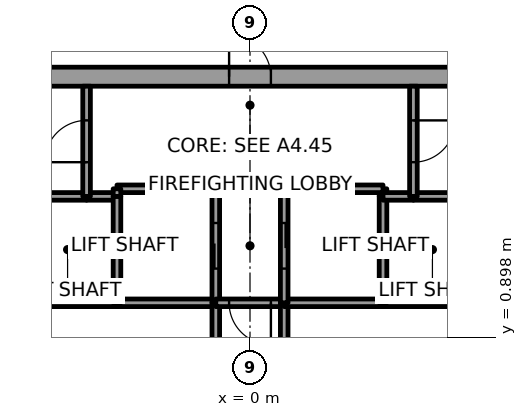
"""IFC4 building model, lengths in metres.
Left out: names, types, materials, properties, quantities, classifications, styles, units other than length and angle.
Written with IfcOpenShell. Run it as: python <this file> out.ifc"""

import sys

from ifc_helpers import new_model, si_unit, direction, frame, frame_2d, origin, place, context, subcontext, project, spatial, rectangle, extrude, element, fill, save


model = new_model("IFC4")
c1 = context("Model", 3, precision=1e-05, world=origin(), true_north=direction((0.0, 1.0)))
c2 = subcontext(c1, "Body", "Model", "MODEL_VIEW")
j1 = project(units=[si_unit("LENGTHUNIT", "METRE"), si_unit("PLANEANGLEUNIT", "RADIAN")], contexts=[c1])
p1 = place(None, origin())
s1 = spatial("IfcSite", under=j1, at=p1, CompositionType="ELEMENT")
p2 = place(p1, origin())
s2 = spatial("IfcBuilding", under=s1, at=p2, CompositionType="ELEMENT")
p3 = place(p2, frame((0.0, 0.0, 193.8)))
s3 = spatial("IfcBuildingStorey", under=s2, at=p3, CompositionType="ELEMENT", Elevation=193.8)
p4 = place(p3, frame((-11.0, 7.75, 0.0), z_axis=(0.0, 0.0, 1.0), x_axis=(1.0, 0.0, 0.0)))
e1 = element("IfcWall", 1, at=p4, inside=s3, PredefinedType="SHEAR", context=c2, shape_type="SweptSolid", body=[
    extrude(rectangle(XDim=22.0, YDim=0.5, at=frame_2d((11.0, 0.0))), origin(), (0.0, 0.0, 1.0), 4.0),
])
p5 = place(p4, frame((10.45, 0.0, 0.0)))
e2 = element("IfcOpeningElement", 2, at=p5, cuts=e1, PredefinedType="OPENING", context=c2, shape_type="SweptSolid", body=[
    extrude(rectangle(XDim=1.1, YDim=2.1, at=frame_2d((0.55, 1.05))), frame((0.0, 0.25, 0.0), z_axis=(0.0, -1.0, 0.0), x_axis=(1.0, 0.0, 0.0)), (0.0, 0.0, 1.0), 0.5),
])
p6 = place(p3, frame((-3.5, 1.8, 0.0), z_axis=(0.0, 0.0, 1.0), x_axis=(-1.0, 0.0, 0.0)))
e3 = element("IfcWall", 3, at=p6, inside=s3, PredefinedType="SOLIDWALL", context=c2, shape_type="SweptSolid", body=[
    extrude(rectangle(XDim=2.6, YDim=0.2, at=frame_2d((1.3, 0.0))), origin(), (0.0, 0.0, 1.0), 3.85),
])
p7 = place(p3, frame((-4.3, 4.6, 0.0), z_axis=(0.0, 0.0, 1.0), x_axis=(-1.0, 0.0, 0.0)))
e4 = element("IfcWall", 4, at=p7, inside=s3, PredefinedType="SOLIDWALL", context=c2, shape_type="SweptSolid", body=[
    extrude(rectangle(XDim=1.8, YDim=0.2, at=frame_2d((0.9, 0.0))), origin(), (0.0, 0.0, 1.0), 3.85),
])
p8 = place(p3, frame((-3.5, 4.6, 0.0), z_axis=(0.0, 0.0, 1.0), x_axis=(-1.0, 0.0, 0.0)))
e5 = element("IfcWall", 5, at=p8, inside=s3, PredefinedType="SOLIDWALL", context=c2, shape_type="SweptSolid", body=[
    extrude(rectangle(XDim=0.8, YDim=0.2, at=frame_2d((0.4, 0.0))), origin(), (0.0, 0.0, 1.0), 3.85),
])
p9 = place(p3, frame((-4.3, 4.6, 0.0), z_axis=(0.0, 0.0, 1.0), x_axis=(0.0, 1.0, 0.0)))
e6 = element("IfcWall", 6, at=p9, inside=s3, PredefinedType="SOLIDWALL", context=c2, shape_type="SweptSolid", body=[
    extrude(rectangle(XDim=2.9, YDim=0.2, at=frame_2d((1.45, 0.0))), origin(), (0.0, 0.0, 1.0), 3.85),
])
p10 = place(p9, frame((0.9, 0.0, 0.0)))
e7 = element("IfcOpeningElement", 7, at=p10, cuts=e6, PredefinedType="OPENING", context=c2, shape_type="SweptSolid", body=[
    extrude(rectangle(XDim=1.1, YDim=2.1, at=frame_2d((0.55, 1.05))), frame((0.0, 0.1, 0.0), z_axis=(0.0, -1.0, 0.0), x_axis=(1.0, 0.0, 0.0)), (0.0, 0.0, 1.0), 0.2),
])
p11 = place(p3, frame((-0.9, 1.8, 0.0), z_axis=(0.0, 0.0, 1.0), x_axis=(-1.0, 0.0, 0.0)))
e8 = element("IfcWall", 8, at=p11, inside=s3, PredefinedType="SOLIDWALL", context=c2, shape_type="SweptSolid", body=[
    extrude(rectangle(XDim=2.6, YDim=0.2, at=frame_2d((1.3, 0.0))), origin(), (0.0, 0.0, 1.0), 3.85),
])
p12 = place(p3, frame((-3.5, 4.6, 0.0), z_axis=(0.0, 0.0, 1.0), x_axis=(0.0, -1.0, 0.0)))
e9 = element("IfcWall", 9, at=p12, inside=s3, PredefinedType="SOLIDWALL", context=c2, shape_type="SweptSolid", body=[
    extrude(rectangle(XDim=2.8, YDim=0.2, at=frame_2d((1.4, 0.0))), origin(), (0.0, 0.0, 1.0), 3.85),
])
p13 = place(p3, frame((-0.9, 1.8, 0.0), z_axis=(0.0, 0.0, 1.0), x_axis=(0.0, 1.0, 0.0)))
e10 = element("IfcWall", 10, at=p13, inside=s3, PredefinedType="SOLIDWALL", context=c2, shape_type="SweptSolid", body=[
    extrude(rectangle(XDim=3.0, YDim=0.2, at=frame_2d((1.5, 0.0))), origin(), (0.0, 0.0, 1.0), 3.85),
])
p14 = place(p13, frame((0.9, 0.0, 0.0)))
e11 = element("IfcOpeningElement", 11, at=p14, cuts=e10, PredefinedType="OPENING", context=c2, shape_type="SweptSolid", body=[
    extrude(rectangle(XDim=1.2, YDim=2.1, at=frame_2d((0.6, 1.05))), frame((0.0, 0.1, 0.0), z_axis=(0.0, -1.0, 0.0), x_axis=(1.0, 0.0, 0.0)), (0.0, 0.0, 1.0), 0.2),
])
p15 = place(p3, frame((-0.9, 4.8, 0.0), z_axis=(0.0, 0.0, 1.0), x_axis=(-1.0, 0.0, 0.0)))
e12 = element("IfcWall", 12, at=p15, inside=s3, PredefinedType="SOLIDWALL", context=c2, shape_type="SweptSolid", body=[
    extrude(rectangle(XDim=2.6, YDim=0.2, at=frame_2d((1.3, 0.0))), origin(), (0.0, 0.0, 1.0), 3.85),
])
p16 = place(p3, frame((-3.5, 4.8, 0.0), z_axis=(0.0, 0.0, 1.0), x_axis=(0.0, -1.0, 0.0)))
e13 = element("IfcWall", 13, at=p16, inside=s3, PredefinedType="SOLIDWALL", context=c2, shape_type="SweptSolid", body=[
    extrude(rectangle(XDim=0.2, YDim=0.2, at=frame_2d((0.1, 0.0))), origin(), (0.0, 0.0, 1.0), 3.85),
])
p17 = place(p3, frame((-0.9, 1.8, 0.0), z_axis=(0.0, 0.0, 1.0), x_axis=(0.0, -1.0, 0.0)))
e14 = element("IfcWall", 14, at=p17, inside=s3, PredefinedType="SOLIDWALL", context=c2, shape_type="SweptSolid", body=[
    extrude(rectangle(XDim=3.6, YDim=0.2, at=frame_2d((1.8, 0.0))), origin(), (0.0, 0.0, 1.0), 3.85),
])
p18 = place(p17, frame((1.05, 0.0, 0.0)))
e15 = element("IfcOpeningElement", 15, at=p18, cuts=e14, PredefinedType="OPENING", context=c2, shape_type="SweptSolid", body=[
    extrude(rectangle(XDim=1.5, YDim=2.1, at=frame_2d((0.75, 1.05))), frame((0.0, 0.1, 0.0), z_axis=(0.0, -1.0, 0.0), x_axis=(1.0, 0.0, 0.0)), (0.0, 0.0, 1.0), 0.2),
])
p19 = place(p3, frame((0.9, 1.8, 0.0), z_axis=(0.0, 0.0, 1.0), x_axis=(-1.0, 0.0, 0.0)))
e16 = element("IfcWall", 16, at=p19, inside=s3, PredefinedType="SOLIDWALL", context=c2, shape_type="SweptSolid", body=[
    extrude(rectangle(XDim=1.8, YDim=0.2, at=frame_2d((0.9, 0.0))), origin(), (0.0, 0.0, 1.0), 3.85),
])
p20 = place(p19, frame((0.35, 0.0, 0.0)))
e17 = element("IfcOpeningElement", 17, at=p20, cuts=e16, PredefinedType="OPENING", context=c2, shape_type="SweptSolid", body=[
    extrude(rectangle(XDim=1.1, YDim=2.1, at=frame_2d((0.55, 1.05))), frame((0.0, 0.1, 0.0), z_axis=(0.0, -1.0, 0.0), x_axis=(1.0, 0.0, 0.0)), (0.0, 0.0, 1.0), 0.2),
])
p21 = place(p3, frame((0.9, -1.8, 0.0), z_axis=(0.0, 0.0, 1.0), x_axis=(0.0, 1.0, 0.0)))
e18 = element("IfcWall", 18, at=p21, inside=s3, PredefinedType="SOLIDWALL", context=c2, shape_type="SweptSolid", body=[
    extrude(rectangle(XDim=3.6, YDim=0.2, at=frame_2d((1.8, 0.0))), origin(), (0.0, 0.0, 1.0), 3.85),
])
p22 = place(p21, frame((1.05, 0.0, 0.0)))
e19 = element("IfcOpeningElement", 19, at=p22, cuts=e18, PredefinedType="OPENING", context=c2, shape_type="SweptSolid", body=[
    extrude(rectangle(XDim=1.5, YDim=2.1, at=frame_2d((0.75, 1.05))), frame((0.0, 0.1, 0.0), z_axis=(0.0, -1.0, 0.0), x_axis=(1.0, 0.0, 0.0)), (0.0, 0.0, 1.0), 0.2),
])
p23 = place(p3, frame((3.5, 1.8, 0.0), z_axis=(0.0, 0.0, 1.0), x_axis=(-1.0, 0.0, 0.0)))
e20 = element("IfcWall", 20, at=p23, inside=s3, PredefinedType="SOLIDWALL", context=c2, shape_type="SweptSolid", body=[
    extrude(rectangle(XDim=2.6, YDim=0.2, at=frame_2d((1.3, 0.0))), origin(), (0.0, 0.0, 1.0), 3.85),
])
p24 = place(p3, frame((3.5, 4.6, 0.0), z_axis=(0.0, 0.0, 1.0), x_axis=(0.0, 1.0, 0.0)))
e21 = element("IfcWall", 21, at=p24, inside=s3, PredefinedType="SOLIDWALL", context=c2, shape_type="SweptSolid", body=[
    extrude(rectangle(XDim=0.2, YDim=0.2, at=frame_2d((0.1, 0.0))), origin(), (0.0, 0.0, 1.0), 3.85),
])
p25 = place(p3, frame((3.5, 4.8, 0.0), z_axis=(0.0, 0.0, 1.0), x_axis=(-1.0, 0.0, 0.0)))
e22 = element("IfcWall", 22, at=p25, inside=s3, PredefinedType="SOLIDWALL", context=c2, shape_type="SweptSolid", body=[
    extrude(rectangle(XDim=2.6, YDim=0.2, at=frame_2d((1.3, 0.0))), origin(), (0.0, 0.0, 1.0), 3.85),
])
p26 = place(p3, frame((0.9, 4.8, 0.0), z_axis=(0.0, 0.0, 1.0), x_axis=(0.0, -1.0, 0.0)))
e23 = element("IfcWall", 23, at=p26, inside=s3, PredefinedType="SOLIDWALL", context=c2, shape_type="SweptSolid", body=[
    extrude(rectangle(XDim=3.0, YDim=0.2, at=frame_2d((1.5, 0.0))), origin(), (0.0, 0.0, 1.0), 3.85),
])
p27 = place(p26, frame((0.9, 0.0, 0.0)))
e24 = element("IfcOpeningElement", 24, at=p27, cuts=e23, PredefinedType="OPENING", context=c2, shape_type="SweptSolid", body=[
    extrude(rectangle(XDim=1.2, YDim=2.1, at=frame_2d((0.6, 1.05))), frame((0.0, 0.1, 0.0), z_axis=(0.0, -1.0, 0.0), x_axis=(1.0, 0.0, 0.0)), (0.0, 0.0, 1.0), 0.2),
])
p28 = place(p3, frame((6.1, 1.8, 0.0), z_axis=(0.0, 0.0, 1.0), x_axis=(-1.0, 0.0, 0.0)))
e25 = element("IfcWall", 25, at=p28, inside=s3, PredefinedType="SOLIDWALL", context=c2, shape_type="SweptSolid", body=[
    extrude(rectangle(XDim=2.6, YDim=0.2, at=frame_2d((1.3, 0.0))), origin(), (0.0, 0.0, 1.0), 3.85),
])
p29 = place(p3, frame((3.5, 1.8, 0.0), z_axis=(0.0, 0.0, 1.0), x_axis=(0.0, 1.0, 0.0)))
e26 = element("IfcWall", 26, at=p29, inside=s3, PredefinedType="SOLIDWALL", context=c2, shape_type="SweptSolid", body=[
    extrude(rectangle(XDim=2.8, YDim=0.2, at=frame_2d((1.4, 0.0))), origin(), (0.0, 0.0, 1.0), 3.85),
])
p30 = place(p3, frame((4.3, 4.6, 0.0), z_axis=(0.0, 0.0, 1.0), x_axis=(-1.0, 0.0, 0.0)))
e27 = element("IfcWall", 27, at=p30, inside=s3, PredefinedType="SOLIDWALL", context=c2, shape_type="SweptSolid", body=[
    extrude(rectangle(XDim=0.8, YDim=0.2, at=frame_2d((0.4, 0.0))), origin(), (0.0, 0.0, 1.0), 3.85),
])
p31 = place(p3, frame((6.1, 4.6, 0.0), z_axis=(0.0, 0.0, 1.0), x_axis=(-1.0, 0.0, 0.0)))
e28 = element("IfcWall", 28, at=p31, inside=s3, PredefinedType="SOLIDWALL", context=c2, shape_type="SweptSolid", body=[
    extrude(rectangle(XDim=1.8, YDim=0.2, at=frame_2d((0.9, 0.0))), origin(), (0.0, 0.0, 1.0), 3.85),
])
p32 = place(p3, frame((4.3, 7.5, 0.0), z_axis=(0.0, 0.0, 1.0), x_axis=(0.0, -1.0, 0.0)))
e29 = element("IfcWall", 29, at=p32, inside=s3, PredefinedType="SOLIDWALL", context=c2, shape_type="SweptSolid", body=[
    extrude(rectangle(XDim=2.9, YDim=0.2, at=frame_2d((1.45, 0.0))), origin(), (0.0, 0.0, 1.0), 3.85),
])
p33 = place(p32, frame((0.9, 0.0, 0.0)))
e30 = element("IfcOpeningElement", 30, at=p33, cuts=e29, PredefinedType="OPENING", context=c2, shape_type="SweptSolid", body=[
    extrude(rectangle(XDim=1.1, YDim=2.1, at=frame_2d((0.55, 1.05))), frame((0.0, 0.1, 0.0), z_axis=(0.0, -1.0, 0.0), x_axis=(1.0, 0.0, 0.0)), (0.0, 0.0, 1.0), 0.2),
])
p34 = place(p14, origin())
e31 = element("IfcDoor", 31, at=p34, inside=s3, OperationType="SLIDING_TO_LEFT", PredefinedType="DOOR", context=c2, shape_type="SweptSolid", body=[
    extrude(rectangle(XDim=1.2, YDim=2.1, at=frame_2d((0.6, 1.05))), frame((0.0, 0.025, 0.0), z_axis=(0.0, -1.0, 0.0), x_axis=(1.0, 0.0, 0.0)), (0.0, 0.0, 1.0), 0.05),
])
fill(e11, e31)
p35 = place(p27, origin())
e32 = element("IfcDoor", 32, at=p35, inside=s3, OperationType="SLIDING_TO_LEFT", PredefinedType="DOOR", context=c2, shape_type="SweptSolid", body=[
    extrude(rectangle(XDim=1.2, YDim=2.1, at=frame_2d((0.6, 1.05))), frame((0.0, 0.025, 0.0), z_axis=(0.0, -1.0, 0.0), x_axis=(1.0, 0.0, 0.0)), (0.0, 0.0, 1.0), 0.05),
])
fill(e24, e32)
p36 = place(p20, origin())
e33 = element("IfcDoor", 33, at=p36, inside=s3, OperationType="SINGLE_SWING_LEFT", PredefinedType="DOOR", context=c2, shape_type="SweptSolid", body=[
    extrude(rectangle(XDim=1.1, YDim=2.1, at=frame_2d((0.55, 1.05))), frame((0.0, 0.025, 0.0), z_axis=(0.0, -1.0, 0.0), x_axis=(1.0, 0.0, 0.0)), (0.0, 0.0, 1.0), 0.05),
])
fill(e17, e33)
p37 = place(p10, origin())
e34 = element("IfcDoor", 34, at=p37, inside=s3, OperationType="SINGLE_SWING_RIGHT", PredefinedType="DOOR", context=c2, shape_type="SweptSolid", body=[
    extrude(rectangle(XDim=1.1, YDim=2.1, at=frame_2d((0.55, 1.05))), frame((0.0, 0.025, 0.0), z_axis=(0.0, -1.0, 0.0), x_axis=(1.0, 0.0, 0.0)), (0.0, 0.0, 1.0), 0.05),
])
fill(e7, e34)
p38 = place(p33, origin())
e35 = element("IfcDoor", 35, at=p38, inside=s3, OperationType="SINGLE_SWING_LEFT", PredefinedType="DOOR", context=c2, shape_type="SweptSolid", body=[
    extrude(rectangle(XDim=1.1, YDim=2.1, at=frame_2d((0.55, 1.05))), frame((0.0, 0.025, 0.0), z_axis=(0.0, -1.0, 0.0), x_axis=(1.0, 0.0, 0.0)), (0.0, 0.0, 1.0), 0.05),
])
fill(e30, e35)
p39 = place(p5, origin())
e36 = element("IfcDoor", 36, at=p39, inside=s3, OperationType="SINGLE_SWING_LEFT", PredefinedType="DOOR", context=c2, shape_type="SweptSolid", body=[
    extrude(rectangle(XDim=1.1, YDim=2.1, at=frame_2d((0.55, 1.05))), frame((0.0, 0.025, 0.0), z_axis=(0.0, -1.0, 0.0), x_axis=(1.0, 0.0, 0.0)), (0.0, 0.0, 1.0), 0.05),
])
fill(e2, e36)
save(model, sys.argv[1])
